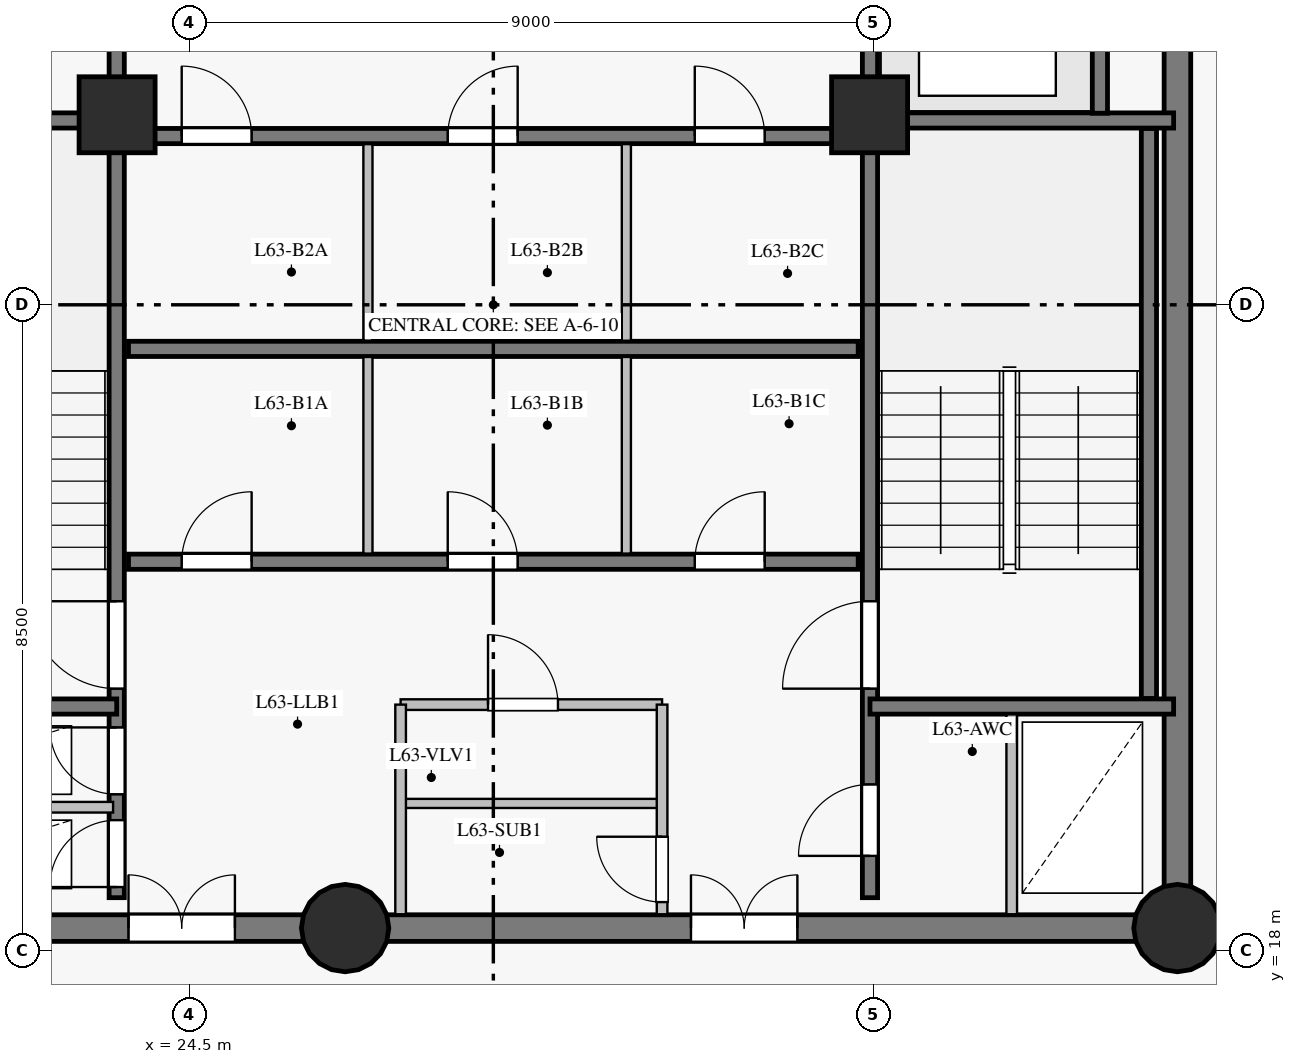
"""IFC4 building model, lengths in metres.
Left out: names, types, materials, properties, quantities, classifications, styles, units other than length and angle.
Written with IfcOpenShell. Run it as: python <this file> out.ifc"""

import sys

from ifc_helpers import new_model, si_unit, direction, frame, frame_2d, origin, origin_with_axes, origin_2d, place, context, subcontext, project, spatial, rectangle, circle, extrude, source, transform, mapped, element, fill, save


model = new_model("IFC4")
c1 = context("Model", 3, precision=1e-05, world=origin(), true_north=direction((0.0, 1.0)))
c2 = subcontext(c1, "Body", "Model", "MODEL_VIEW")
j1 = project(units=[si_unit("LENGTHUNIT", "METRE"), si_unit("PLANEANGLEUNIT", "RADIAN")], contexts=[c1])
p1 = place(None, origin())
s1 = spatial("IfcSite", under=j1, at=p1, CompositionType="ELEMENT")
p2 = place(p1, origin())
s2 = spatial("IfcBuilding", under=s1, at=p2, CompositionType="ELEMENT")
p3 = place(p2, frame((0.0, 0.0, 216.9)))
s3 = spatial("IfcBuildingStorey", under=s2, at=p3, CompositionType="ELEMENT", Elevation=216.9)
p4 = place(p3, frame((19.5, 18.3, 0.0), z_axis=(0.0, 0.0, 1.0), x_axis=(1.0, 0.0, 0.0)))
e1 = element("IfcWall", 1, at=p4, inside=s3, PredefinedType="SHEAR", context=c2, shape_type="SweptSolid", body=[
    extrude(rectangle(XDim=7.05, YDim=0.35, at=frame_2d((3.525, 0.0))), origin(), (0.0, 0.0, 1.0), 2.85),
])
p5 = place(p4, frame((4.2, 0.0, 0.0)))
e2 = element("IfcOpeningElement", 2, at=p5, cuts=e1, PredefinedType="OPENING", context=c2, shape_type="SweptSolid", body=[
    extrude(rectangle(XDim=1.4, YDim=2.2, at=frame_2d((0.7, 1.1))), frame((0.0, 0.185, 0.0), z_axis=(0.0, -1.0, 0.0), x_axis=(1.0, 0.0, 0.0)), (0.0, 0.0, 1.0), 0.37),
])
p6 = place(p3, frame((26.55, 18.3, 0.0), z_axis=(0.0, 0.0, 1.0), x_axis=(1.0, 0.0, 0.0)))
e3 = element("IfcWall", 3, at=p6, inside=s3, PredefinedType="SHEAR", context=c2, shape_type="SweptSolid", body=[
    extrude(rectangle(XDim=10.95, YDim=0.35, at=frame_2d((5.475, 0.0))), origin(), (0.0, 0.0, 1.0), 2.85),
])
p7 = place(p6, frame((4.55, 0.0, 0.0)))
e4 = element("IfcOpeningElement", 4, at=p7, cuts=e3, PredefinedType="OPENING", context=c2, shape_type="SweptSolid", body=[
    extrude(rectangle(XDim=1.4, YDim=2.2, at=frame_2d((0.7, 1.1))), frame((0.0, 0.185, 0.0), z_axis=(0.0, -1.0, 0.0), x_axis=(1.0, 0.0, 0.0)), (0.0, 0.0, 1.0), 0.37),
])
p8 = place(p3, frame((37.5, 18.3, 0.0), z_axis=(0.0, 0.0, 1.0), x_axis=(0.0, 1.0, 0.0)))
e5 = element("IfcWall", 5, at=p8, inside=s3, PredefinedType="SHEAR", context=c2, shape_type="SweptSolid", body=[
    extrude(rectangle(XDim=16.4, YDim=0.35, at=frame_2d((8.2, 0.0))), origin(), (0.0, 0.0, 1.0), 2.85),
])
p9 = place(p8, frame((13.85, 0.0, 0.0)))
e6 = element("IfcOpeningElement", 6, at=p9, cuts=e5, PredefinedType="OPENING", context=c2, shape_type="SweptSolid", body=[
    extrude(rectangle(XDim=1.2, YDim=2.15, at=frame_2d((0.6, 1.075))), frame((0.0, 0.185, 0.0), z_axis=(0.0, -1.0, 0.0), x_axis=(1.0, 0.0, 0.0)), (0.0, 0.0, 1.0), 0.37),
])
m1 = source(origin_with_axes(), c2, "Body", "SweptSolid", [
    extrude(circle(Radius=0.575, at=origin_2d()), origin(), (0.0, 0.0, 1.0), 3.05),
])
for number, where, z_axis, x_axis in (
    (7, (26.55, 18.3, 0.0), (0.0, 0.0, 1.0), (1.0, 0.0, 0.0)),
    (8, (37.5, 18.3, 0.0), (0.0, 0.0, 1.0), (1.0, 0.0, 0.0)),
):
    element("IfcColumn", number, at=place(p3, frame(where, z_axis=z_axis, x_axis=x_axis)), inside=s3, PredefinedType="COLUMN", context=c2, shape_type="MappedRepresentation", body=[
        mapped(m1, transform((0.0, 0.0, 0.0), scale=1.0)),
    ])
m2 = source(origin_with_axes(), c2, "Body", "SweptSolid", [
    extrude(rectangle(XDim=1.0, YDim=1.0, at=origin_2d()), origin(), (0.0, 0.0, 1.0), 3.05),
])
for number, where, z_axis, x_axis in (
    (9, (23.55, 29.0, 0.0), (0.0, 0.0, 1.0), (1.0, 0.0, 0.0)),
    (10, (33.45, 29.0, 0.0), (0.0, 0.0, 1.0), (1.0, 0.0, 0.0)),
):
    element("IfcColumn", number, at=place(p3, frame(where, z_axis=z_axis, x_axis=x_axis)), inside=s3, PredefinedType="COLUMN", context=c2, shape_type="MappedRepresentation", body=[
        mapped(m2, transform((0.0, 0.0, 0.0), scale=1.0)),
    ])
p10 = place(p3, frame((23.545, 18.7, 0.0), z_axis=(0.0, 0.0, 1.0), x_axis=(0.0, 1.0, 0.0)))
e11 = element("IfcWall", 11, at=p10, inside=s3, PredefinedType="SHEAR", context=c2, shape_type="SweptSolid", body=[
    extrude(rectangle(XDim=15.6, YDim=0.2, at=frame_2d((7.8, 0.0))), origin(), (0.0, 0.0, 1.0), 2.85),
])
p11 = place(p10, frame((2.75, 0.0, 0.0)))
e12 = element("IfcOpeningElement", 12, at=p11, cuts=e11, PredefinedType="OPENING", context=c2, shape_type="SweptSolid", body=[
    extrude(rectangle(XDim=1.15, YDim=2.15, at=frame_2d((0.575, 1.075))), frame((0.0, 0.11, 0.0), z_axis=(0.0, -1.0, 0.0), x_axis=(1.0, 0.0, 0.0)), (0.0, 0.0, 1.0), 0.22),
])
p12 = place(p10, frame((0.14, 0.0, 0.0)))
e13 = element("IfcOpeningElement", 13, at=p12, cuts=e11, PredefinedType="OPENING", context=c2, shape_type="SweptSolid", body=[
    extrude(rectangle(XDim=0.88, YDim=2.1, at=frame_2d((0.44, 1.05))), frame((0.0, 0.11, 0.0), z_axis=(0.0, -1.0, 0.0), x_axis=(1.0, 0.0, 0.0)), (0.0, 0.0, 1.0), 0.22),
])
p13 = place(p10, frame((1.36, 0.0, 0.0)))
e14 = element("IfcOpeningElement", 14, at=p13, cuts=e11, PredefinedType="OPENING", context=c2, shape_type="SweptSolid", body=[
    extrude(rectangle(XDim=0.88, YDim=2.1, at=frame_2d((0.44, 1.05))), frame((0.0, 0.11, 0.0), z_axis=(0.0, -1.0, 0.0), x_axis=(1.0, 0.0, 0.0)), (0.0, 0.0, 1.0), 0.22),
])
p14 = place(p10, frame((12.1, 0.0, 0.0)))
e15 = element("IfcOpeningElement", 15, at=p14, cuts=e11, PredefinedType="OPENING", context=c2, shape_type="SweptSolid", body=[
    extrude(rectangle(XDim=1.12, YDim=2.15, at=frame_2d((0.56, 1.075))), frame((0.0, 0.11, 0.0), z_axis=(0.0, -1.0, 0.0), x_axis=(1.0, 0.0, 0.0)), (0.0, 0.0, 1.0), 0.22),
])
p15 = place(p10, frame((14.05, 0.0, 0.0)))
e16 = element("IfcOpeningElement", 16, at=p15, cuts=e11, PredefinedType="OPENING", context=c2, shape_type="SweptSolid", body=[
    extrude(rectangle(XDim=1.12, YDim=2.15, at=frame_2d((0.56, 1.075))), frame((0.0, 0.11, 0.0), z_axis=(0.0, -1.0, 0.0), x_axis=(1.0, 0.0, 0.0)), (0.0, 0.0, 1.0), 0.22),
])
p16 = place(p3, frame((33.455, 18.7, 0.0), z_axis=(0.0, 0.0, 1.0), x_axis=(0.0, 1.0, 0.0)))
e17 = element("IfcWall", 17, at=p16, inside=s3, PredefinedType="SHEAR", context=c2, shape_type="SweptSolid", body=[
    extrude(rectangle(XDim=15.6, YDim=0.2, at=frame_2d((7.8, 0.0))), origin(), (0.0, 0.0, 1.0), 2.85),
])
p17 = place(p16, frame((2.75, 0.0, 0.0)))
e18 = element("IfcOpeningElement", 18, at=p17, cuts=e17, PredefinedType="OPENING", context=c2, shape_type="SweptSolid", body=[
    extrude(rectangle(XDim=1.15, YDim=2.15, at=frame_2d((0.575, 1.075))), frame((0.0, 0.11, 0.0), z_axis=(0.0, -1.0, 0.0), x_axis=(1.0, 0.0, 0.0)), (0.0, 0.0, 1.0), 0.22),
])
p18 = place(p16, frame((0.55, 0.0, 0.0)))
e19 = element("IfcOpeningElement", 19, at=p18, cuts=e17, PredefinedType="OPENING", context=c2, shape_type="SweptSolid", body=[
    extrude(rectangle(XDim=0.94, YDim=2.1, at=frame_2d((0.47, 1.05))), frame((0.0, 0.11, 0.0), z_axis=(0.0, -1.0, 0.0), x_axis=(1.0, 0.0, 0.0)), (0.0, 0.0, 1.0), 0.22),
])
p19 = place(p3, frame((23.7, 23.12, 0.0), z_axis=(0.0, 0.0, 1.0), x_axis=(1.0, 0.0, 0.0)))
e20 = element("IfcWall", 20, at=p19, inside=s3, PredefinedType="SHEAR", context=c2, shape_type="SweptSolid", body=[
    extrude(rectangle(XDim=9.6, YDim=0.2, at=frame_2d((4.8, 0.0))), origin(), (0.0, 0.0, 1.0), 2.85),
])
p20 = place(p19, frame((0.7, 0.0, 0.0)))
e21 = element("IfcOpeningElement", 21, at=p20, cuts=e20, PredefinedType="OPENING", context=c2, shape_type="SweptSolid", body=[
    extrude(rectangle(XDim=0.92, YDim=2.1, at=frame_2d((0.46, 1.05))), frame((0.0, 0.11, 0.0), z_axis=(0.0, -1.0, 0.0), x_axis=(1.0, 0.0, 0.0)), (0.0, 0.0, 1.0), 0.22),
])
p21 = place(p19, frame((4.2, 0.0, 0.0)))
e22 = element("IfcOpeningElement", 22, at=p21, cuts=e20, PredefinedType="OPENING", context=c2, shape_type="SweptSolid", body=[
    extrude(rectangle(XDim=0.92, YDim=2.1, at=frame_2d((0.46, 1.05))), frame((0.0, 0.11, 0.0), z_axis=(0.0, -1.0, 0.0), x_axis=(1.0, 0.0, 0.0)), (0.0, 0.0, 1.0), 0.22),
])
p22 = place(p19, frame((7.45, 0.0, 0.0)))
e23 = element("IfcOpeningElement", 23, at=p22, cuts=e20, PredefinedType="OPENING", context=c2, shape_type="SweptSolid", body=[
    extrude(rectangle(XDim=0.92, YDim=2.1, at=frame_2d((0.46, 1.05))), frame((0.0, 0.11, 0.0), z_axis=(0.0, -1.0, 0.0), x_axis=(1.0, 0.0, 0.0)), (0.0, 0.0, 1.0), 0.22),
])
p23 = place(p3, frame((23.7, 25.92, 0.0), z_axis=(0.0, 0.0, 1.0), x_axis=(1.0, 0.0, 0.0)))
e24 = element("IfcWall", 24, at=p23, inside=s3, PredefinedType="SHEAR", context=c2, shape_type="SweptSolid", body=[
    extrude(rectangle(XDim=9.6, YDim=0.2, at=frame_2d((4.8, 0.0))), origin(), (0.0, 0.0, 1.0), 2.85),
])
p24 = place(p3, frame((23.7, 28.72, 0.0), z_axis=(0.0, 0.0, 1.0), x_axis=(1.0, 0.0, 0.0)))
e25 = element("IfcWall", 25, at=p24, inside=s3, PredefinedType="SHEAR", context=c2, shape_type="SweptSolid", body=[
    extrude(rectangle(XDim=9.6, YDim=0.2, at=frame_2d((4.8, 0.0))), origin(), (0.0, 0.0, 1.0), 2.85),
])
p25 = place(p24, frame((0.7, 0.0, 0.0)))
e26 = element("IfcOpeningElement", 26, at=p25, cuts=e25, PredefinedType="OPENING", context=c2, shape_type="SweptSolid", body=[
    extrude(rectangle(XDim=0.92, YDim=2.1, at=frame_2d((0.46, 1.05))), frame((0.0, 0.11, 0.0), z_axis=(0.0, -1.0, 0.0), x_axis=(1.0, 0.0, 0.0)), (0.0, 0.0, 1.0), 0.22),
])
p26 = place(p24, frame((4.2, 0.0, 0.0)))
e27 = element("IfcOpeningElement", 27, at=p26, cuts=e25, PredefinedType="OPENING", context=c2, shape_type="SweptSolid", body=[
    extrude(rectangle(XDim=0.92, YDim=2.1, at=frame_2d((0.46, 1.05))), frame((0.0, 0.11, 0.0), z_axis=(0.0, -1.0, 0.0), x_axis=(1.0, 0.0, 0.0)), (0.0, 0.0, 1.0), 0.22),
])
p27 = place(p24, frame((7.45, 0.0, 0.0)))
e28 = element("IfcOpeningElement", 28, at=p27, cuts=e25, PredefinedType="OPENING", context=c2, shape_type="SweptSolid", body=[
    extrude(rectangle(XDim=0.92, YDim=2.1, at=frame_2d((0.46, 1.05))), frame((0.0, 0.11, 0.0), z_axis=(0.0, -1.0, 0.0), x_axis=(1.0, 0.0, 0.0)), (0.0, 0.0, 1.0), 0.22),
])
p28 = place(p3, frame((37.125, 21.32, 0.0), z_axis=(0.0, 0.0, 1.0), x_axis=(0.0, 1.0, 0.0)))
e29 = element("IfcWall", 29, at=p28, inside=s3, PredefinedType="SHEAR", context=c2, shape_type="SweptSolid", body=[
    extrude(rectangle(XDim=7.5, YDim=0.2, at=frame_2d((3.75, 0.0))), origin(), (0.0, 0.0, 1.0), 2.85),
])
for number, where, z_axis, x_axis in (
    (30, (33.455, 21.215, 0.0), (0.0, 0.0, 1.0), (1.0, 0.0, 0.0)),
    (31, (33.455, 28.925, 0.0), (0.0, 0.0, 1.0), (1.0, 0.0, 0.0)),
    (32, (19.55, 21.215, 0.0), (0.0, 0.0, 1.0), (1.0, 0.0, 0.0)),
    (33, (19.55, 28.925, 0.0), (0.0, 0.0, 1.0), (1.0, 0.0, 0.0)),
):
    element("IfcWall", number, at=place(p3, frame(where, z_axis=z_axis, x_axis=x_axis)), inside=s3, PredefinedType="SHEAR", context=c2, shape_type="SweptSolid", body=[
        extrude(rectangle(XDim=3.995, YDim=0.2, at=frame_2d((1.998, 0.0))), origin(), (0.0, 0.0, 1.0), 2.85),
    ])
p29 = place(p3, frame((36.48, 29.02, 0.0), z_axis=(0.0, 0.0, 1.0), x_axis=(0.0, 1.0, 0.0)))
e34 = element("IfcWall", 34, at=p29, inside=s3, PredefinedType="SHEAR", context=c2, shape_type="SweptSolid", body=[
    extrude(rectangle(XDim=2.86, YDim=0.2, at=frame_2d((1.43, 0.0))), origin(), (0.0, 0.0, 1.0), 2.85),
])
p30 = place(p3, frame((19.682, 19.89, 0.0), z_axis=(0.0, 0.0, 1.0), x_axis=(1.0, 0.0, 0.0)))
e35 = element("IfcWall", 35, at=p30, inside=s3, PredefinedType="PARTITIONING", context=c2, shape_type="SweptSolid", body=[
    extrude(rectangle(XDim=3.815, YDim=0.14, at=frame_2d((1.908, 0.0))), origin(), (0.0, 0.0, 1.0), 2.85),
])
p31 = place(p3, frame((27.28, 21.24, 0.0), z_axis=(0.0, 0.0, 1.0), x_axis=(1.0, 0.0, 0.0)))
e36 = element("IfcWall", 36, at=p31, inside=s3, PredefinedType="PARTITIONING", context=c2, shape_type="SweptSolid", body=[
    extrude(rectangle(XDim=3.44, YDim=0.14, at=frame_2d((1.72, 0.0))), origin(), (0.0, 0.0, 1.0), 2.85),
])
p32 = place(p31, frame((1.15, 0.0, 0.0)))
e37 = element("IfcOpeningElement", 37, at=p32, cuts=e36, PredefinedType="OPENING", context=c2, shape_type="SweptSolid", body=[
    extrude(rectangle(XDim=0.92, YDim=2.1, at=frame_2d((0.46, 1.05))), frame((0.0, 0.08, 0.0), z_axis=(0.0, -1.0, 0.0), x_axis=(1.0, 0.0, 0.0)), (0.0, 0.0, 1.0), 0.16),
])
p33 = place(p3, frame((27.28, 19.94, 0.0), z_axis=(0.0, 0.0, 1.0), x_axis=(1.0, 0.0, 0.0)))
e38 = element("IfcWall", 38, at=p33, inside=s3, PredefinedType="PARTITIONING", context=c2, shape_type="SweptSolid", body=[
    extrude(rectangle(XDim=3.44, YDim=0.12, at=frame_2d((1.72, 0.0))), origin(), (0.0, 0.0, 1.0), 2.85),
])
p34 = place(p3, frame((27.28, 18.482, 0.0), z_axis=(0.0, 0.0, 1.0), x_axis=(0.0, 1.0, 0.0)))
e39 = element("IfcWall", 39, at=p34, inside=s3, PredefinedType="PARTITIONING", context=c2, shape_type="SweptSolid", body=[
    extrude(rectangle(XDim=2.758, YDim=0.14, at=frame_2d((1.379, 0.0))), origin(), (0.0, 0.0, 1.0), 2.85),
])
p35 = place(p3, frame((30.72, 18.482, 0.0), z_axis=(0.0, 0.0, 1.0), x_axis=(0.0, 1.0, 0.0)))
e40 = element("IfcWall", 40, at=p35, inside=s3, PredefinedType="PARTITIONING", context=c2, shape_type="SweptSolid", body=[
    extrude(rectangle(XDim=2.758, YDim=0.14, at=frame_2d((1.379, 0.0))), origin(), (0.0, 0.0, 1.0), 2.85),
])
p36 = place(p35, frame((0.16, 0.0, 0.0)))
e41 = element("IfcOpeningElement", 41, at=p36, cuts=e40, PredefinedType="OPENING", context=c2, shape_type="SweptSolid", body=[
    extrude(rectangle(XDim=0.86, YDim=2.1, at=frame_2d((0.43, 1.05))), frame((0.0, 0.08, 0.0), z_axis=(0.0, -1.0, 0.0), x_axis=(1.0, 0.0, 0.0)), (0.0, 0.0, 1.0), 0.16),
])
for number, where, z_axis, x_axis in (
    (42, (26.85, 23.227, 0.0), (0.0, 0.0, 1.0), (0.0, 1.0, 0.0)),
    (43, (30.25, 23.227, 0.0), (0.0, 0.0, 1.0), (0.0, 1.0, 0.0)),
    (44, (26.85, 26.027, 0.0), (0.0, 0.0, 1.0), (0.0, 1.0, 0.0)),
    (45, (30.25, 26.027, 0.0), (0.0, 0.0, 1.0), (0.0, 1.0, 0.0)),
):
    element("IfcWall", number, at=place(p3, frame(where, z_axis=z_axis, x_axis=x_axis)), inside=s3, PredefinedType="PARTITIONING", context=c2, shape_type="SweptSolid", body=[
        extrude(rectangle(XDim=2.587, YDim=0.12, at=frame_2d((1.293, 0.0))), origin(), (0.0, 0.0, 1.0), 2.85),
    ])
p37 = place(p3, frame((35.32, 18.482, 0.0), z_axis=(0.0, 0.0, 1.0), x_axis=(0.0, 1.0, 0.0)))
e46 = element("IfcWall", 46, at=p37, inside=s3, PredefinedType="PARTITIONING", context=c2, shape_type="SweptSolid", body=[
    extrude(rectangle(XDim=2.629, YDim=0.14, at=frame_2d((1.314, 0.0))), origin(), (0.0, 0.0, 1.0), 2.85),
])
m3 = source(origin_with_axes(), c2, "Body", "SweptSolid", [
    extrude(rectangle(XDim=1.15, YDim=2.15, at=frame_2d((0.575, 1.075))), frame((0.0, 0.025, 0.0), z_axis=(0.0, -1.0, 0.0), x_axis=(1.0, 0.0, 0.0)), (0.0, 0.0, 1.0), 0.05),
])
p38 = place(p11, origin())
e47 = element("IfcDoor", 47, at=p38, inside=s3, OperationType="SINGLE_SWING_RIGHT", PredefinedType="DOOR", context=c2, shape_type="MappedRepresentation", body=[
    mapped(m3, transform((0.0, 0.0, 0.0), scale=1.0)),
])
fill(e12, e47)
p39 = place(p17, origin())
e48 = element("IfcDoor", 48, at=p39, inside=s3, OperationType="SINGLE_SWING_LEFT", PredefinedType="DOOR", context=c2, shape_type="MappedRepresentation", body=[
    mapped(m3, transform((0.0, 0.0, 0.0), scale=1.0)),
])
fill(e18, e48)
m4 = source(origin_with_axes(), c2, "Body", "SweptSolid", [
    extrude(rectangle(XDim=0.88, YDim=2.1, at=frame_2d((0.44, 1.05))), frame((0.0, 0.025, 0.0), z_axis=(0.0, -1.0, 0.0), x_axis=(1.0, 0.0, 0.0)), (0.0, 0.0, 1.0), 0.05),
])
p40 = place(p12, origin())
e49 = element("IfcDoor", 49, at=p40, inside=s3, OperationType="SINGLE_SWING_LEFT", PredefinedType="DOOR", context=c2, shape_type="MappedRepresentation", body=[
    mapped(m4, transform((0.0, 0.0, 0.0), scale=1.0)),
])
fill(e13, e49)
p41 = place(p13, origin())
e50 = element("IfcDoor", 50, at=p41, inside=s3, OperationType="SINGLE_SWING_RIGHT", PredefinedType="DOOR", context=c2, shape_type="MappedRepresentation", body=[
    mapped(m4, transform((0.0, 0.0, 0.0), scale=1.0)),
])
fill(e14, e50)
m5 = source(origin_with_axes(), c2, "Body", "SweptSolid", [
    extrude(rectangle(XDim=1.4, YDim=2.2, at=frame_2d((0.7, 1.1))), frame((0.0, 0.025, 0.0), z_axis=(0.0, -1.0, 0.0), x_axis=(1.0, 0.0, 0.0)), (0.0, 0.0, 1.0), 0.05),
])
p42 = place(p5, origin())
e51 = element("IfcDoor", 51, at=p42, inside=s3, OperationType="DOUBLE_DOOR_SINGLE_SWING", PredefinedType="DOOR", context=c2, shape_type="MappedRepresentation", body=[
    mapped(m5, transform((0.0, 0.0, 0.0), scale=1.0)),
])
fill(e2, e51)
p43 = place(p7, origin())
e52 = element("IfcDoor", 52, at=p43, inside=s3, OperationType="DOUBLE_DOOR_SINGLE_SWING", PredefinedType="DOOR", context=c2, shape_type="MappedRepresentation", body=[
    mapped(m5, transform((0.0, 0.0, 0.0), scale=1.0)),
])
fill(e4, e52)
m6 = source(origin_with_axes(), c2, "Body", "SweptSolid", [
    extrude(rectangle(XDim=0.94, YDim=2.1, at=frame_2d((0.47, 1.05))), frame((0.0, 0.025, 0.0), z_axis=(0.0, -1.0, 0.0), x_axis=(1.0, 0.0, 0.0)), (0.0, 0.0, 1.0), 0.05),
])
p44 = place(p18, origin())
e53 = element("IfcDoor", 53, at=p44, inside=s3, OperationType="SINGLE_SWING_LEFT", PredefinedType="DOOR", context=c2, shape_type="MappedRepresentation", body=[
    mapped(m6, transform((0.0, 0.0, 0.0), scale=1.0)),
])
fill(e19, e53)
m7 = source(origin_with_axes(), c2, "Body", "SweptSolid", [
    extrude(rectangle(XDim=0.86, YDim=2.1, at=frame_2d((0.43, 1.05))), frame((0.0, 0.025, 0.0), z_axis=(0.0, -1.0, 0.0), x_axis=(1.0, 0.0, 0.0)), (0.0, 0.0, 1.0), 0.05),
])
p45 = place(p36, origin())
e54 = element("IfcDoor", 54, at=p45, inside=s3, OperationType="SINGLE_SWING_RIGHT", PredefinedType="DOOR", context=c2, shape_type="MappedRepresentation", body=[
    mapped(m7, transform((0.0, 0.0, 0.0), scale=1.0)),
])
fill(e41, e54)
m8 = source(origin_with_axes(), c2, "Body", "SweptSolid", [
    extrude(rectangle(XDim=0.92, YDim=2.1, at=frame_2d((0.46, 1.05))), frame((0.0, 0.025, 0.0), z_axis=(0.0, -1.0, 0.0), x_axis=(1.0, 0.0, 0.0)), (0.0, 0.0, 1.0), 0.05),
])
p46 = place(p32, origin())
e55 = element("IfcDoor", 55, at=p46, inside=s3, OperationType="SINGLE_SWING_LEFT", PredefinedType="DOOR", context=c2, shape_type="MappedRepresentation", body=[
    mapped(m8, transform((0.0, 0.0, 0.0), scale=1.0)),
])
fill(e37, e55)
p47 = place(p20, origin())
e56 = element("IfcDoor", 56, at=p47, inside=s3, OperationType="SINGLE_SWING_RIGHT", PredefinedType="DOOR", context=c2, shape_type="MappedRepresentation", body=[
    mapped(m8, transform((0.0, 0.0, 0.0), scale=1.0)),
])
fill(e21, e56)
p48 = place(p21, origin())
e57 = element("IfcDoor", 57, at=p48, inside=s3, OperationType="SINGLE_SWING_LEFT", PredefinedType="DOOR", context=c2, shape_type="MappedRepresentation", body=[
    mapped(m8, transform((0.0, 0.0, 0.0), scale=1.0)),
])
fill(e22, e57)
p49 = place(p22, origin())
e58 = element("IfcDoor", 58, at=p49, inside=s3, OperationType="SINGLE_SWING_RIGHT", PredefinedType="DOOR", context=c2, shape_type="MappedRepresentation", body=[
    mapped(m8, transform((0.0, 0.0, 0.0), scale=1.0)),
])
fill(e23, e58)
p50 = place(p25, origin())
e59 = element("IfcDoor", 59, at=p50, inside=s3, OperationType="SINGLE_SWING_LEFT", PredefinedType="DOOR", context=c2, shape_type="MappedRepresentation", body=[
    mapped(m8, transform((0.0, 0.0, 0.0), scale=1.0)),
])
fill(e26, e59)
p51 = place(p26, origin())
e60 = element("IfcDoor", 60, at=p51, inside=s3, OperationType="SINGLE_SWING_RIGHT", PredefinedType="DOOR", context=c2, shape_type="MappedRepresentation", body=[
    mapped(m8, transform((0.0, 0.0, 0.0), scale=1.0)),
])
fill(e27, e60)
p52 = place(p27, origin())
e61 = element("IfcDoor", 61, at=p52, inside=s3, OperationType="SINGLE_SWING_LEFT", PredefinedType="DOOR", context=c2, shape_type="MappedRepresentation", body=[
    mapped(m8, transform((0.0, 0.0, 0.0), scale=1.0)),
])
fill(e28, e61)
save(model, sys.argv[1])
